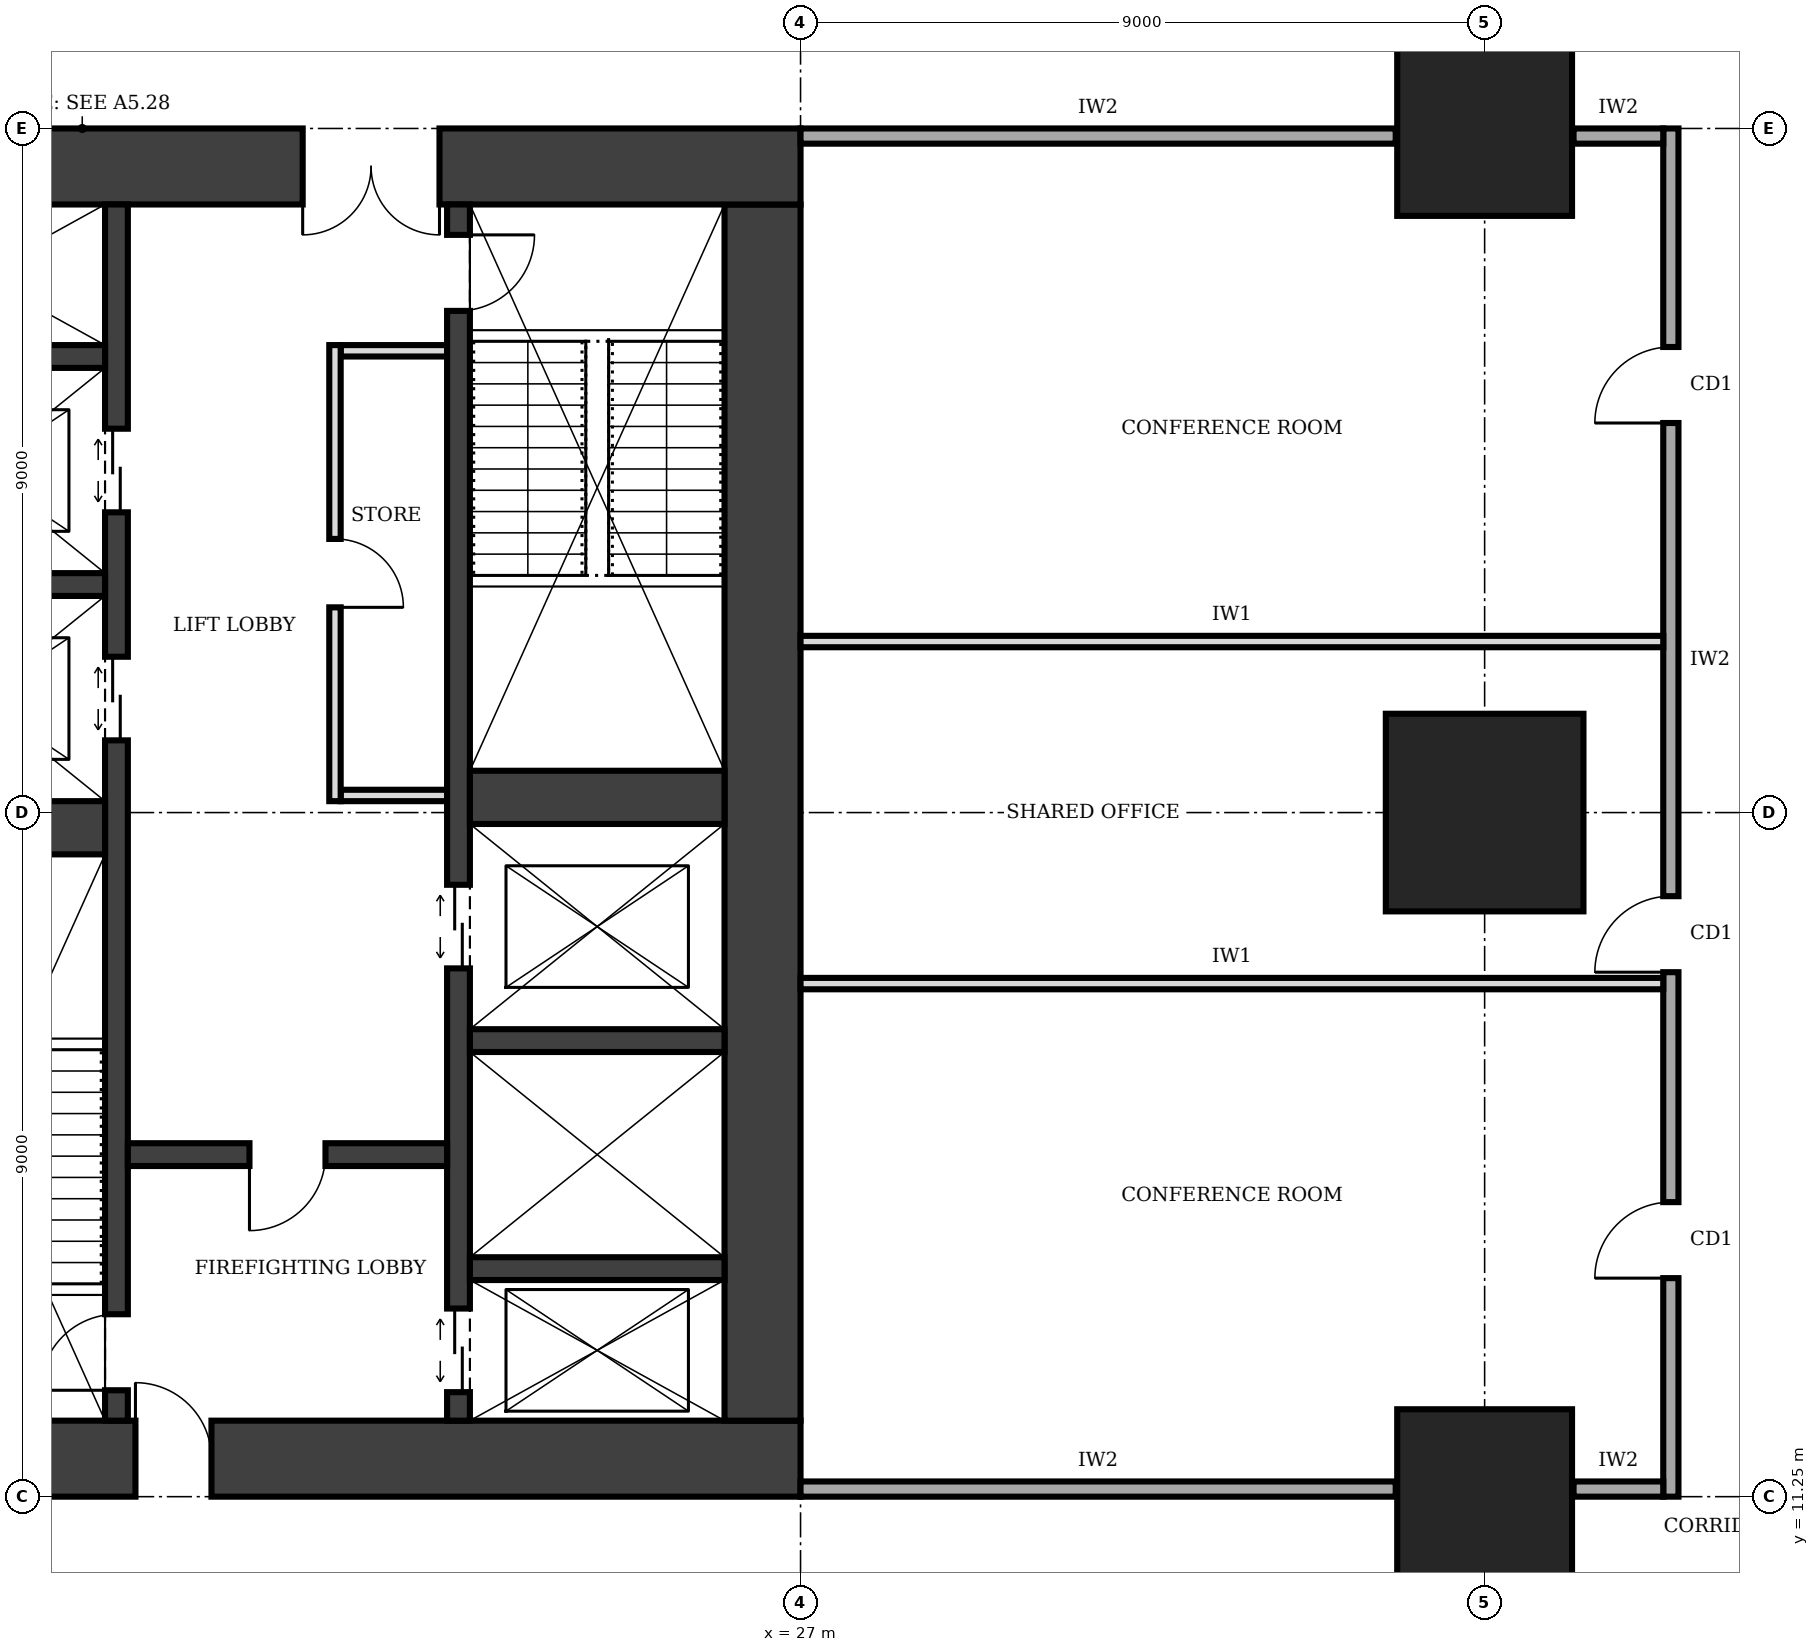
"""IFC4 building model, lengths in metres.
Left out: names, types, materials, properties, quantities, classifications, styles, units other than length and angle.
Written with IfcOpenShell. Run it as: python <this file> out.ifc"""

import sys

from ifc_helpers import new_model, si_unit, direction, frame, frame_2d, origin, origin_2d, place, context, subcontext, project, spatial, rectangle, extrude, element, fill, save


model = new_model("IFC4")
c1 = context("Model", 3, precision=1e-05, world=origin(), true_north=direction((0.0, 1.0)))
c2 = subcontext(c1, "Body", "Model", "MODEL_VIEW")
j1 = project(units=[si_unit("LENGTHUNIT", "METRE"), si_unit("PLANEANGLEUNIT", "RADIAN")], contexts=[c1])
p1 = place(None, origin())
s1 = spatial("IfcSite", under=j1, at=p1, CompositionType="ELEMENT")
p2 = place(p1, origin())
s2 = spatial("IfcBuilding", under=s1, at=p2, CompositionType="ELEMENT")
p3 = place(p2, frame((0.0, 0.0, 97.0)))
s3 = spatial("IfcBuildingStorey", under=s2, at=p3, CompositionType="ELEMENT", Elevation=97.0)
p4 = place(p3, frame((13.5, 11.75, 0.0), z_axis=(0.0, 0.0, 1.0), x_axis=(1.0, 0.0, 0.0)))
e1 = element("IfcWall", 1, at=p4, inside=s3, PredefinedType="SHEAR", context=c2, shape_type="SweptSolid", body=[
    extrude(rectangle(XDim=13.5, YDim=1.0, at=frame_2d((6.75, 0.0))), origin(), (0.0, 0.0, 1.0), 4.0),
])
p5 = place(p4, frame((4.75, 0.0, 0.0)))
e2 = element("IfcOpeningElement", 2, at=p5, cuts=e1, PredefinedType="OPENING", context=c2, shape_type="SweptSolid", body=[
    extrude(rectangle(XDim=1.0, YDim=2.1, at=frame_2d((0.5, 1.05))), frame((0.0, 0.51, 0.0), z_axis=(0.0, -1.0, 0.0), x_axis=(1.0, 0.0, 0.0)), (0.0, 0.0, 1.0), 1.02),
])
p6 = place(p3, frame((26.5, 12.25, 0.0), z_axis=(0.0, 0.0, 1.0), x_axis=(0.0, 1.0, 0.0)))
e3 = element("IfcWall", 3, at=p6, inside=s3, PredefinedType="SHEAR", context=c2, shape_type="SweptSolid", body=[
    extrude(rectangle(XDim=16.0, YDim=1.0, at=frame_2d((8.0, 0.0))), origin(), (0.0, 0.0, 1.0), 4.0),
])
p7 = place(p3, frame((27.0, 28.75, 0.0), z_axis=(0.0, 0.0, 1.0), x_axis=(-1.0, 0.0, 0.0)))
e4 = element("IfcWall", 4, at=p7, inside=s3, PredefinedType="SHEAR", context=c2, shape_type="SweptSolid", body=[
    extrude(rectangle(XDim=13.5, YDim=1.0, at=frame_2d((6.75, 0.0))), origin(), (0.0, 0.0, 1.0), 4.0),
])
p8 = place(p7, frame((4.75, 0.0, 0.0)))
e5 = element("IfcOpeningElement", 5, at=p8, cuts=e4, PredefinedType="OPENING", context=c2, shape_type="SweptSolid", body=[
    extrude(rectangle(XDim=1.8, YDim=2.1, at=frame_2d((0.9, 1.05))), frame((0.0, 0.51, 0.0), z_axis=(0.0, -1.0, 0.0), x_axis=(1.0, 0.0, 0.0)), (0.0, 0.0, 1.0), 1.02),
])
p9 = place(p3, frame((18.0, 12.25, 0.0), z_axis=(0.0, 0.0, 1.0), x_axis=(0.0, 1.0, 0.0)))
e6 = element("IfcWall", 6, at=p9, inside=s3, PredefinedType="SHEAR", context=c2, shape_type="SweptSolid", body=[
    extrude(rectangle(XDim=16.0, YDim=0.3, at=frame_2d((8.0, 0.0))), origin(), (0.0, 0.0, 1.0), 4.0),
])
p10 = place(p9, frame((0.4, 0.0, 0.0)))
e7 = element("IfcOpeningElement", 7, at=p10, cuts=e6, PredefinedType="OPENING", context=c2, shape_type="SweptSolid", body=[
    extrude(rectangle(XDim=1.0, YDim=2.1, at=frame_2d((0.5, 1.05))), frame((0.0, 0.16, 0.0), z_axis=(0.0, -1.0, 0.0), x_axis=(1.0, 0.0, 0.0)), (0.0, 0.0, 1.0), 0.32),
])
p11 = place(p9, frame((8.95, 0.0, 0.0)))
e8 = element("IfcOpeningElement", 8, at=p11, cuts=e6, PredefinedType="OPENING", context=c2, shape_type="SweptSolid", body=[
    extrude(rectangle(XDim=1.1, YDim=2.1, at=frame_2d((0.55, 1.05))), frame((0.0, 0.16, 0.0), z_axis=(0.0, -1.0, 0.0), x_axis=(1.0, 0.0, 0.0)), (0.0, 0.0, 1.0), 0.32),
])
p12 = place(p9, frame((11.95, 0.0, 0.0)))
e9 = element("IfcOpeningElement", 9, at=p12, cuts=e6, PredefinedType="OPENING", context=c2, shape_type="SweptSolid", body=[
    extrude(rectangle(XDim=1.1, YDim=2.1, at=frame_2d((0.55, 1.05))), frame((0.0, 0.16, 0.0), z_axis=(0.0, -1.0, 0.0), x_axis=(1.0, 0.0, 0.0)), (0.0, 0.0, 1.0), 0.32),
])
p13 = place(p3, frame((22.5, 12.25, 0.0), z_axis=(0.0, 0.0, 1.0), x_axis=(0.0, 1.0, 0.0)))
e10 = element("IfcWall", 10, at=p13, inside=s3, PredefinedType="SHEAR", context=c2, shape_type="SweptSolid", body=[
    extrude(rectangle(XDim=16.0, YDim=0.3, at=frame_2d((8.0, 0.0))), origin(), (0.0, 0.0, 1.0), 4.0),
])
p14 = place(p13, frame((14.6, 0.0, 0.0)))
e11 = element("IfcOpeningElement", 11, at=p14, cuts=e10, PredefinedType="OPENING", context=c2, shape_type="SweptSolid", body=[
    extrude(rectangle(XDim=1.0, YDim=2.1, at=frame_2d((0.5, 1.05))), frame((0.0, 0.16, 0.0), z_axis=(0.0, -1.0, 0.0), x_axis=(1.0, 0.0, 0.0)), (0.0, 0.0, 1.0), 0.32),
])
p15 = place(p13, frame((0.375, 0.0, 0.0)))
e12 = element("IfcOpeningElement", 12, at=p15, cuts=e10, PredefinedType="OPENING", context=c2, shape_type="SweptSolid", body=[
    extrude(rectangle(XDim=1.1, YDim=2.1, at=frame_2d((0.55, 1.05))), frame((0.0, 0.16, 0.0), z_axis=(0.0, -1.0, 0.0), x_axis=(1.0, 0.0, 0.0)), (0.0, 0.0, 1.0), 0.32),
])
p16 = place(p13, frame((5.95, 0.0, 0.0)))
e13 = element("IfcOpeningElement", 13, at=p16, cuts=e10, PredefinedType="OPENING", context=c2, shape_type="SweptSolid", body=[
    extrude(rectangle(XDim=1.1, YDim=2.1, at=frame_2d((0.55, 1.05))), frame((0.0, 0.16, 0.0), z_axis=(0.0, -1.0, 0.0), x_axis=(1.0, 0.0, 0.0)), (0.0, 0.0, 1.0), 0.32),
])
p17 = place(p3, frame((14.5, 20.05, 0.0), z_axis=(0.0, 0.0, 1.0), x_axis=(1.0, 0.0, 0.0)))
e14 = element("IfcWall", 14, at=p17, inside=s3, PredefinedType="SHEAR", context=c2, shape_type="SweptSolid", body=[
    extrude(rectangle(XDim=3.35, YDim=0.7, at=frame_2d((1.675, 0.0))), origin(), (0.0, 0.0, 1.0), 4.0),
])
p18 = place(p3, frame((18.15, 15.75, 0.0), z_axis=(0.0, 0.0, 1.0), x_axis=(1.0, 0.0, 0.0)))
e15 = element("IfcWall", 15, at=p18, inside=s3, PredefinedType="SHEAR", context=c2, shape_type="SweptSolid", body=[
    extrude(rectangle(XDim=4.2, YDim=0.3, at=frame_2d((2.1, 0.0))), origin(), (0.0, 0.0, 1.0), 4.0),
])
p19 = place(p18, frame((1.6, 0.0, 0.0)))
e16 = element("IfcOpeningElement", 16, at=p19, cuts=e15, PredefinedType="OPENING", context=c2, shape_type="SweptSolid", body=[
    extrude(rectangle(XDim=1.0, YDim=2.1, at=frame_2d((0.5, 1.05))), frame((0.0, 0.16, 0.0), z_axis=(0.0, -1.0, 0.0), x_axis=(1.0, 0.0, 0.0)), (0.0, 0.0, 1.0), 0.32),
])
for number, where, z_axis, x_axis in (
    (17, (22.65, 14.25, 0.0), (0.0, 0.0, 1.0), (1.0, 0.0, 0.0)),
    (18, (22.65, 17.25, 0.0), (0.0, 0.0, 1.0), (1.0, 0.0, 0.0)),
):
    element("IfcWall", number, at=place(p3, frame(where, z_axis=z_axis, x_axis=x_axis)), inside=s3, PredefinedType="SHEAR", context=c2, shape_type="SweptSolid", body=[
        extrude(rectangle(XDim=3.35, YDim=0.3, at=frame_2d((1.675, 0.0))), origin(), (0.0, 0.0, 1.0), 4.0),
    ])
p20 = place(p3, frame((22.65, 20.45, 0.0), z_axis=(0.0, 0.0, 1.0), x_axis=(1.0, 0.0, 0.0)))
e19 = element("IfcWall", 19, at=p20, inside=s3, PredefinedType="SHEAR", context=c2, shape_type="SweptSolid", body=[
    extrude(rectangle(XDim=3.35, YDim=0.7, at=frame_2d((1.675, 0.0))), origin(), (0.0, 0.0, 1.0), 4.0),
])
for number, where, z_axis, x_axis in (
    (20, (14.5, 23.25, 0.0), (0.0, 0.0, 1.0), (1.0, 0.0, 0.0)),
    (21, (14.5, 26.25, 0.0), (0.0, 0.0, 1.0), (1.0, 0.0, 0.0)),
):
    element("IfcWall", number, at=place(p3, frame(where, z_axis=z_axis, x_axis=x_axis)), inside=s3, PredefinedType="SHEAR", context=c2, shape_type="SweptSolid", body=[
        extrude(rectangle(XDim=3.35, YDim=0.3, at=frame_2d((1.675, 0.0))), origin(), (0.0, 0.0, 1.0), 4.0),
    ])
p21 = place(p3, frame((36.0, 11.25, 0.0), z_axis=(0.0, 0.0, 1.0), x_axis=(1.0, 0.0, 0.0)))
e22 = element("IfcColumn", 22, at=p21, inside=s3, PredefinedType="COLUMN", context=c2, shape_type="SweptSolid", body=[
    extrude(rectangle(XDim=2.3, YDim=2.3, at=origin_2d()), origin(), (0.0, 0.0, 1.0), 4.0),
])
p22 = place(p3, frame((36.0, 20.25, 0.0), z_axis=(0.0, 0.0, 1.0), x_axis=(1.0, 0.0, 0.0)))
e23 = element("IfcColumn", 23, at=p22, inside=s3, PredefinedType="COLUMN", context=c2, shape_type="SweptSolid", body=[
    extrude(rectangle(XDim=2.6, YDim=2.6, at=origin_2d()), origin(), (0.0, 0.0, 1.0), 4.0),
])
p23 = place(p3, frame((36.0, 29.25, 0.0), z_axis=(0.0, 0.0, 1.0), x_axis=(1.0, 0.0, 0.0)))
e24 = element("IfcColumn", 24, at=p23, inside=s3, PredefinedType="COLUMN", context=c2, shape_type="SweptSolid", body=[
    extrude(rectangle(XDim=2.3, YDim=2.3, at=origin_2d()), origin(), (0.0, 0.0, 1.0), 4.0),
])
p24 = place(p3, frame((20.875, 20.4, 0.0), z_axis=(0.0, 0.0, 1.0), x_axis=(0.0, 1.0, 0.0)))
e25 = element("IfcWall", 25, at=p24, inside=s3, PredefinedType="PARTITIONING", context=c2, shape_type="SweptSolid", body=[
    extrude(rectangle(XDim=6.0, YDim=0.15, at=frame_2d((3.0, 0.0))), origin(), (0.0, 0.0, 1.0), 3.75),
])
p25 = place(p24, frame((2.55, 0.0, 0.0)))
e26 = element("IfcOpeningElement", 26, at=p25, cuts=e25, PredefinedType="OPENING", context=c2, shape_type="SweptSolid", body=[
    extrude(rectangle(XDim=0.9, YDim=2.1, at=frame_2d((0.45, 1.05))), frame((0.0, 0.085, 0.0), z_axis=(0.0, -1.0, 0.0), x_axis=(1.0, 0.0, 0.0)), (0.0, 0.0, 1.0), 0.17),
])
for number, where, z_axis, x_axis in (
    (27, (20.95, 20.475, 0.0), (0.0, 0.0, 1.0), (1.0, 0.0, 0.0)),
    (28, (20.95, 26.325, 0.0), (0.0, 0.0, 1.0), (1.0, 0.0, 0.0)),
):
    element("IfcWall", number, at=place(p3, frame(where, z_axis=z_axis, x_axis=x_axis)), inside=s3, PredefinedType="PARTITIONING", context=c2, shape_type="SweptSolid", body=[
        extrude(rectangle(XDim=1.4, YDim=0.15, at=frame_2d((0.7, 0.0))), origin(), (0.0, 0.0, 1.0), 3.75),
    ])
p26 = place(p3, frame((38.45, 11.25, 0.0), z_axis=(0.0, 0.0, 1.0), x_axis=(0.0, 1.0, 0.0)))
e29 = element("IfcWall", 29, at=p26, inside=s3, PredefinedType="SOLIDWALL", context=c2, shape_type="SweptSolid", body=[
    extrude(rectangle(XDim=18.0, YDim=0.2, at=frame_2d((9.0, 0.0))), origin(), (0.0, 0.0, 1.0), 3.75),
])
p27 = place(p26, frame((2.875, 0.0, 0.0)))
e30 = element("IfcOpeningElement", 30, at=p27, cuts=e29, PredefinedType="OPENING", context=c2, shape_type="SweptSolid", body=[
    extrude(rectangle(XDim=1.0, YDim=2.1, at=frame_2d((0.5, 1.05))), frame((0.0, 0.11, 0.0), z_axis=(0.0, -1.0, 0.0), x_axis=(1.0, 0.0, 0.0)), (0.0, 0.0, 1.0), 0.22),
])
p28 = place(p26, frame((6.9, 0.0, 0.0)))
e31 = element("IfcOpeningElement", 31, at=p28, cuts=e29, PredefinedType="OPENING", context=c2, shape_type="SweptSolid", body=[
    extrude(rectangle(XDim=1.0, YDim=2.1, at=frame_2d((0.5, 1.05))), frame((0.0, 0.11, 0.0), z_axis=(0.0, -1.0, 0.0), x_axis=(1.0, 0.0, 0.0)), (0.0, 0.0, 1.0), 0.22),
])
p29 = place(p26, frame((14.125, 0.0, 0.0)))
e32 = element("IfcOpeningElement", 32, at=p29, cuts=e29, PredefinedType="OPENING", context=c2, shape_type="SweptSolid", body=[
    extrude(rectangle(XDim=1.0, YDim=2.1, at=frame_2d((0.5, 1.05))), frame((0.0, 0.11, 0.0), z_axis=(0.0, -1.0, 0.0), x_axis=(1.0, 0.0, 0.0)), (0.0, 0.0, 1.0), 0.22),
])
p30 = place(p3, frame((27.0, 11.35, 0.0), z_axis=(0.0, 0.0, 1.0), x_axis=(1.0, 0.0, 0.0)))
e33 = element("IfcWall", 33, at=p30, inside=s3, PredefinedType="SOLIDWALL", context=c2, shape_type="SweptSolid", body=[
    extrude(rectangle(XDim=7.83, YDim=0.2, at=frame_2d((3.915, 0.0))), origin(), (0.0, 0.0, 1.0), 2.85),
])
p31 = place(p3, frame((37.17, 11.35, 0.0), z_axis=(0.0, 0.0, 1.0), x_axis=(1.0, 0.0, 0.0)))
e34 = element("IfcWall", 34, at=p31, inside=s3, PredefinedType="SOLIDWALL", context=c2, shape_type="SweptSolid", body=[
    extrude(rectangle(XDim=1.18, YDim=0.2, at=frame_2d((0.59, 0.0))), origin(), (0.0, 0.0, 1.0), 2.85),
])
p32 = place(p3, frame((27.0, 29.15, 0.0), z_axis=(0.0, 0.0, 1.0), x_axis=(1.0, 0.0, 0.0)))
e35 = element("IfcWall", 35, at=p32, inside=s3, PredefinedType="SOLIDWALL", context=c2, shape_type="SweptSolid", body=[
    extrude(rectangle(XDim=7.83, YDim=0.2, at=frame_2d((3.915, 0.0))), origin(), (0.0, 0.0, 1.0), 2.85),
])
p33 = place(p3, frame((37.17, 29.15, 0.0), z_axis=(0.0, 0.0, 1.0), x_axis=(1.0, 0.0, 0.0)))
e36 = element("IfcWall", 36, at=p33, inside=s3, PredefinedType="SOLIDWALL", context=c2, shape_type="SweptSolid", body=[
    extrude(rectangle(XDim=1.18, YDim=0.2, at=frame_2d((0.59, 0.0))), origin(), (0.0, 0.0, 1.0), 2.85),
])
for number, where, z_axis, x_axis in (
    (37, (27.0, 18.0, 0.0), (0.0, 0.0, 1.0), (1.0, 0.0, 0.0)),
    (38, (27.0, 22.5, 0.0), (0.0, 0.0, 1.0), (1.0, 0.0, 0.0)),
):
    element("IfcWall", number, at=place(p3, frame(where, z_axis=z_axis, x_axis=x_axis)), inside=s3, PredefinedType="PARTITIONING", context=c2, shape_type="SweptSolid", body=[
        extrude(rectangle(XDim=11.35, YDim=0.15, at=frame_2d((5.675, 0.0))), origin(), (0.0, 0.0, 1.0), 3.75),
    ])
p34 = place(p5, origin())
e39 = element("IfcDoor", 39, at=p34, inside=s3, OperationType="SINGLE_SWING_LEFT", PredefinedType="DOOR", context=c2, shape_type="SweptSolid", body=[
    extrude(rectangle(XDim=1.0, YDim=2.1, at=frame_2d((0.5, 1.05))), frame((0.0, 0.025, 0.0), z_axis=(0.0, -1.0, 0.0), x_axis=(1.0, 0.0, 0.0)), (0.0, 0.0, 1.0), 0.05),
])
fill(e2, e39)
p35 = place(p8, origin())
e40 = element("IfcDoor", 40, at=p35, inside=s3, OperationType="DOUBLE_DOOR_SINGLE_SWING", PredefinedType="DOOR", context=c2, shape_type="SweptSolid", body=[
    extrude(rectangle(XDim=1.8, YDim=2.1, at=frame_2d((0.9, 1.05))), frame((0.0, 0.025, 0.0), z_axis=(0.0, -1.0, 0.0), x_axis=(1.0, 0.0, 0.0)), (0.0, 0.0, 1.0), 0.05),
])
fill(e5, e40)
p36 = place(p19, frame((1.0, 0.0, 0.0), z_axis=(0.0, 0.0, 1.0), x_axis=(-1.0, 0.0, 0.0)))
e41 = element("IfcDoor", 41, at=p36, inside=s3, OperationType="SINGLE_SWING_RIGHT", PredefinedType="DOOR", context=c2, shape_type="SweptSolid", body=[
    extrude(rectangle(XDim=1.0, YDim=2.1, at=frame_2d((0.5, 1.05))), frame((0.0, 0.025, 0.0), z_axis=(0.0, -1.0, 0.0), x_axis=(1.0, 0.0, 0.0)), (0.0, 0.0, 1.0), 0.05),
])
fill(e16, e41)
p37 = place(p10, origin())
e42 = element("IfcDoor", 42, at=p37, inside=s3, OperationType="SINGLE_SWING_LEFT", PredefinedType="DOOR", context=c2, shape_type="SweptSolid", body=[
    extrude(rectangle(XDim=1.0, YDim=2.1, at=frame_2d((0.5, 1.05))), frame((0.0, 0.025, 0.0), z_axis=(0.0, -1.0, 0.0), x_axis=(1.0, 0.0, 0.0)), (0.0, 0.0, 1.0), 0.05),
])
fill(e7, e42)
p38 = place(p14, frame((1.0, 0.0, 0.0), z_axis=(0.0, 0.0, 1.0), x_axis=(-1.0, 0.0, 0.0)))
e43 = element("IfcDoor", 43, at=p38, inside=s3, OperationType="SINGLE_SWING_LEFT", PredefinedType="DOOR", context=c2, shape_type="SweptSolid", body=[
    extrude(rectangle(XDim=1.0, YDim=2.1, at=frame_2d((0.5, 1.05))), frame((0.0, 0.025, 0.0), z_axis=(0.0, -1.0, 0.0), x_axis=(1.0, 0.0, 0.0)), (0.0, 0.0, 1.0), 0.05),
])
fill(e11, e43)
p39 = place(p15, origin())
e44 = element("IfcDoor", 44, at=p39, inside=s3, OperationType="DOUBLE_DOOR_SLIDING", PredefinedType="DOOR", context=c2, shape_type="SweptSolid", body=[
    extrude(rectangle(XDim=1.1, YDim=2.1, at=frame_2d((0.55, 1.05))), frame((0.0, 0.025, 0.0), z_axis=(0.0, -1.0, 0.0), x_axis=(1.0, 0.0, 0.0)), (0.0, 0.0, 1.0), 0.05),
])
fill(e12, e44)
p40 = place(p11, origin())
e45 = element("IfcDoor", 45, at=p40, inside=s3, OperationType="DOUBLE_DOOR_SLIDING", PredefinedType="DOOR", context=c2, shape_type="SweptSolid", body=[
    extrude(rectangle(XDim=1.1, YDim=2.1, at=frame_2d((0.55, 1.05))), frame((0.0, 0.025, 0.0), z_axis=(0.0, -1.0, 0.0), x_axis=(1.0, 0.0, 0.0)), (0.0, 0.0, 1.0), 0.05),
])
fill(e8, e45)
p41 = place(p12, origin())
e46 = element("IfcDoor", 46, at=p41, inside=s3, OperationType="DOUBLE_DOOR_SLIDING", PredefinedType="DOOR", context=c2, shape_type="SweptSolid", body=[
    extrude(rectangle(XDim=1.1, YDim=2.1, at=frame_2d((0.55, 1.05))), frame((0.0, 0.025, 0.0), z_axis=(0.0, -1.0, 0.0), x_axis=(1.0, 0.0, 0.0)), (0.0, 0.0, 1.0), 0.05),
])
fill(e9, e46)
p42 = place(p16, origin())
e47 = element("IfcDoor", 47, at=p42, inside=s3, OperationType="DOUBLE_DOOR_SLIDING", PredefinedType="DOOR", context=c2, shape_type="SweptSolid", body=[
    extrude(rectangle(XDim=1.1, YDim=2.1, at=frame_2d((0.55, 1.05))), frame((0.0, 0.025, 0.0), z_axis=(0.0, -1.0, 0.0), x_axis=(1.0, 0.0, 0.0)), (0.0, 0.0, 1.0), 0.05),
])
fill(e13, e47)
p43 = place(p25, frame((0.9, 0.0, 0.0), z_axis=(0.0, 0.0, 1.0), x_axis=(-1.0, 0.0, 0.0)))
e48 = element("IfcDoor", 48, at=p43, inside=s3, OperationType="SINGLE_SWING_RIGHT", PredefinedType="DOOR", context=c2, shape_type="SweptSolid", body=[
    extrude(rectangle(XDim=0.9, YDim=2.1, at=frame_2d((0.45, 1.05))), frame((0.0, 0.025, 0.0), z_axis=(0.0, -1.0, 0.0), x_axis=(1.0, 0.0, 0.0)), (0.0, 0.0, 1.0), 0.05),
])
fill(e26, e48)
p44 = place(p27, origin())
e49 = element("IfcDoor", 49, at=p44, inside=s3, OperationType="SINGLE_SWING_LEFT", PredefinedType="DOOR", context=c2, shape_type="SweptSolid", body=[
    extrude(rectangle(XDim=1.0, YDim=2.1, at=frame_2d((0.5, 1.05))), frame((0.0, 0.025, 0.0), z_axis=(0.0, -1.0, 0.0), x_axis=(1.0, 0.0, 0.0)), (0.0, 0.0, 1.0), 0.05),
])
fill(e30, e49)
p45 = place(p28, origin())
e50 = element("IfcDoor", 50, at=p45, inside=s3, OperationType="SINGLE_SWING_LEFT", PredefinedType="DOOR", context=c2, shape_type="SweptSolid", body=[
    extrude(rectangle(XDim=1.0, YDim=2.1, at=frame_2d((0.5, 1.05))), frame((0.0, 0.025, 0.0), z_axis=(0.0, -1.0, 0.0), x_axis=(1.0, 0.0, 0.0)), (0.0, 0.0, 1.0), 0.05),
])
fill(e31, e50)
p46 = place(p29, origin())
e51 = element("IfcDoor", 51, at=p46, inside=s3, OperationType="SINGLE_SWING_LEFT", PredefinedType="DOOR", context=c2, shape_type="SweptSolid", body=[
    extrude(rectangle(XDim=1.0, YDim=2.1, at=frame_2d((0.5, 1.05))), frame((0.0, 0.025, 0.0), z_axis=(0.0, -1.0, 0.0), x_axis=(1.0, 0.0, 0.0)), (0.0, 0.0, 1.0), 0.05),
])
fill(e32, e51)
save(model, sys.argv[1])
